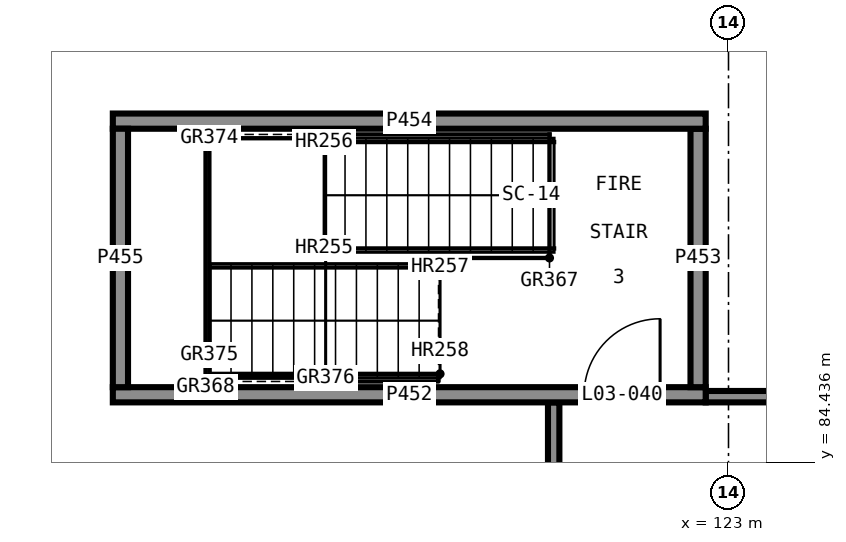
"""IFC4 building model, lengths in metres.
Left out: names, types, materials, properties, quantities, classifications, styles, units other than length and angle.
Written with IfcOpenShell. Run it as: python <this file> out.ifc"""

import sys

from ifc_helpers import new_model, si_unit, direction, frame, frame_2d, origin, place, context, subcontext, project, spatial, rectangle, extrude, element, fill, save


model = new_model("IFC4")
c1 = context("Model", 3, precision=1e-05, world=origin(), true_north=direction((0.0, 1.0)))
c2 = subcontext(c1, "Body", "Model", "MODEL_VIEW")
j1 = project(units=[si_unit("LENGTHUNIT", "METRE"), si_unit("PLANEANGLEUNIT", "RADIAN")], contexts=[c1])
p1 = place(None, origin())
s1 = spatial("IfcSite", under=j1, at=p1, CompositionType="ELEMENT")
p2 = place(p1, origin())
s2 = spatial("IfcBuilding", under=s1, at=p2, CompositionType="ELEMENT")
p3 = place(p2, frame((0.0, 0.0, 13.5)))
s3 = spatial("IfcBuildingStorey", under=s2, at=p3, CompositionType="ELEMENT", Elevation=13.5)
p4 = place(p3, frame((114.9, 85.325, 0.0), z_axis=(0.0, 0.0, 1.0), x_axis=(1.0, 0.0, 0.0)))
e1 = element("IfcWall", 1, at=p4, inside=s3, PredefinedType="SHEAR", context=c2, shape_type="SweptSolid", body=[
    extrude(rectangle(XDim=7.8, YDim=0.2, at=frame_2d((3.9, 0.0))), origin(), (0.0, 0.0, 1.0), 3.58),
])
p5 = place(p4, frame((6.2, 0.0, 0.0)))
e2 = element("IfcOpeningElement", 2, at=p5, cuts=e1, PredefinedType="OPENING", context=c2, shape_type="SweptSolid", body=[
    extrude(rectangle(XDim=1.0, YDim=2.1, at=frame_2d((0.5, 1.05))), frame((0.0, 0.11, 0.0), z_axis=(0.0, -1.0, 0.0), x_axis=(1.0, 0.0, 0.0)), (0.0, 0.0, 1.0), 0.22),
])
p6 = place(p3, frame((122.6, 85.425, 0.0), z_axis=(0.0, 0.0, 1.0), x_axis=(0.0, 1.0, 0.0)))
e3 = element("IfcWall", 3, at=p6, inside=s3, PredefinedType="SHEAR", context=c2, shape_type="SweptSolid", body=[
    extrude(rectangle(XDim=3.4, YDim=0.2, at=frame_2d((1.7, 0.0))), origin(), (0.0, 0.0, 1.0), 3.58),
])
p7 = place(p3, frame((122.7, 88.925, 0.0), z_axis=(0.0, 0.0, 1.0), x_axis=(-1.0, 0.0, 0.0)))
e4 = element("IfcWall", 4, at=p7, inside=s3, PredefinedType="SHEAR", context=c2, shape_type="SweptSolid", body=[
    extrude(rectangle(XDim=7.8, YDim=0.2, at=frame_2d((3.9, 0.0))), origin(), (0.0, 0.0, 1.0), 3.58),
])
p8 = place(p3, frame((115.0, 88.825, 0.0), z_axis=(0.0, 0.0, 1.0), x_axis=(0.0, -1.0, 0.0)))
e5 = element("IfcWall", 5, at=p8, inside=s3, PredefinedType="SHEAR", context=c2, shape_type="SweptSolid", body=[
    extrude(rectangle(XDim=3.4, YDim=0.2, at=frame_2d((1.7, 0.0))), origin(), (0.0, 0.0, 1.0), 3.58),
])
p9 = place(p3, frame((120.7, 62.7, 0.0), z_axis=(0.0, 0.0, 1.0), x_axis=(0.0, 1.0, 0.0)))
e6 = element("IfcWall", 6, at=p9, inside=s3, PredefinedType="PARTITIONING", context=c2, shape_type="SweptSolid", body=[
    extrude(rectangle(XDim=22.525, YDim=0.15, at=frame_2d((11.263, 0.0))), origin(), (0.0, 0.0, 1.0), 3.58),
])
p10 = place(p3, frame((122.7, 85.3, 0.0), z_axis=(0.0, 0.0, 1.0), x_axis=(1.0, 0.0, 0.0)))
e7 = element("IfcWall", 7, at=p10, inside=s3, PredefinedType="PARTITIONING", context=c2, shape_type="SweptSolid", body=[
    extrude(rectangle(XDim=9.9, YDim=0.15, at=frame_2d((4.95, 0.0))), origin(), (0.0, 0.0, 1.0), 3.58),
])
p11 = place(p5, origin())
e8 = element("IfcDoor", 8, at=p11, inside=s3, OperationType="SINGLE_SWING_LEFT", PredefinedType="DOOR", context=c2, shape_type="SweptSolid", body=[
    extrude(rectangle(XDim=1.0, YDim=2.1, at=frame_2d((0.5, 1.05))), frame((0.0, 0.025, 0.0), z_axis=(0.0, -1.0, 0.0), x_axis=(1.0, 0.0, 0.0)), (0.0, 0.0, 1.0), 0.05),
])
fill(e2, e8)
save(model, sys.argv[1])
